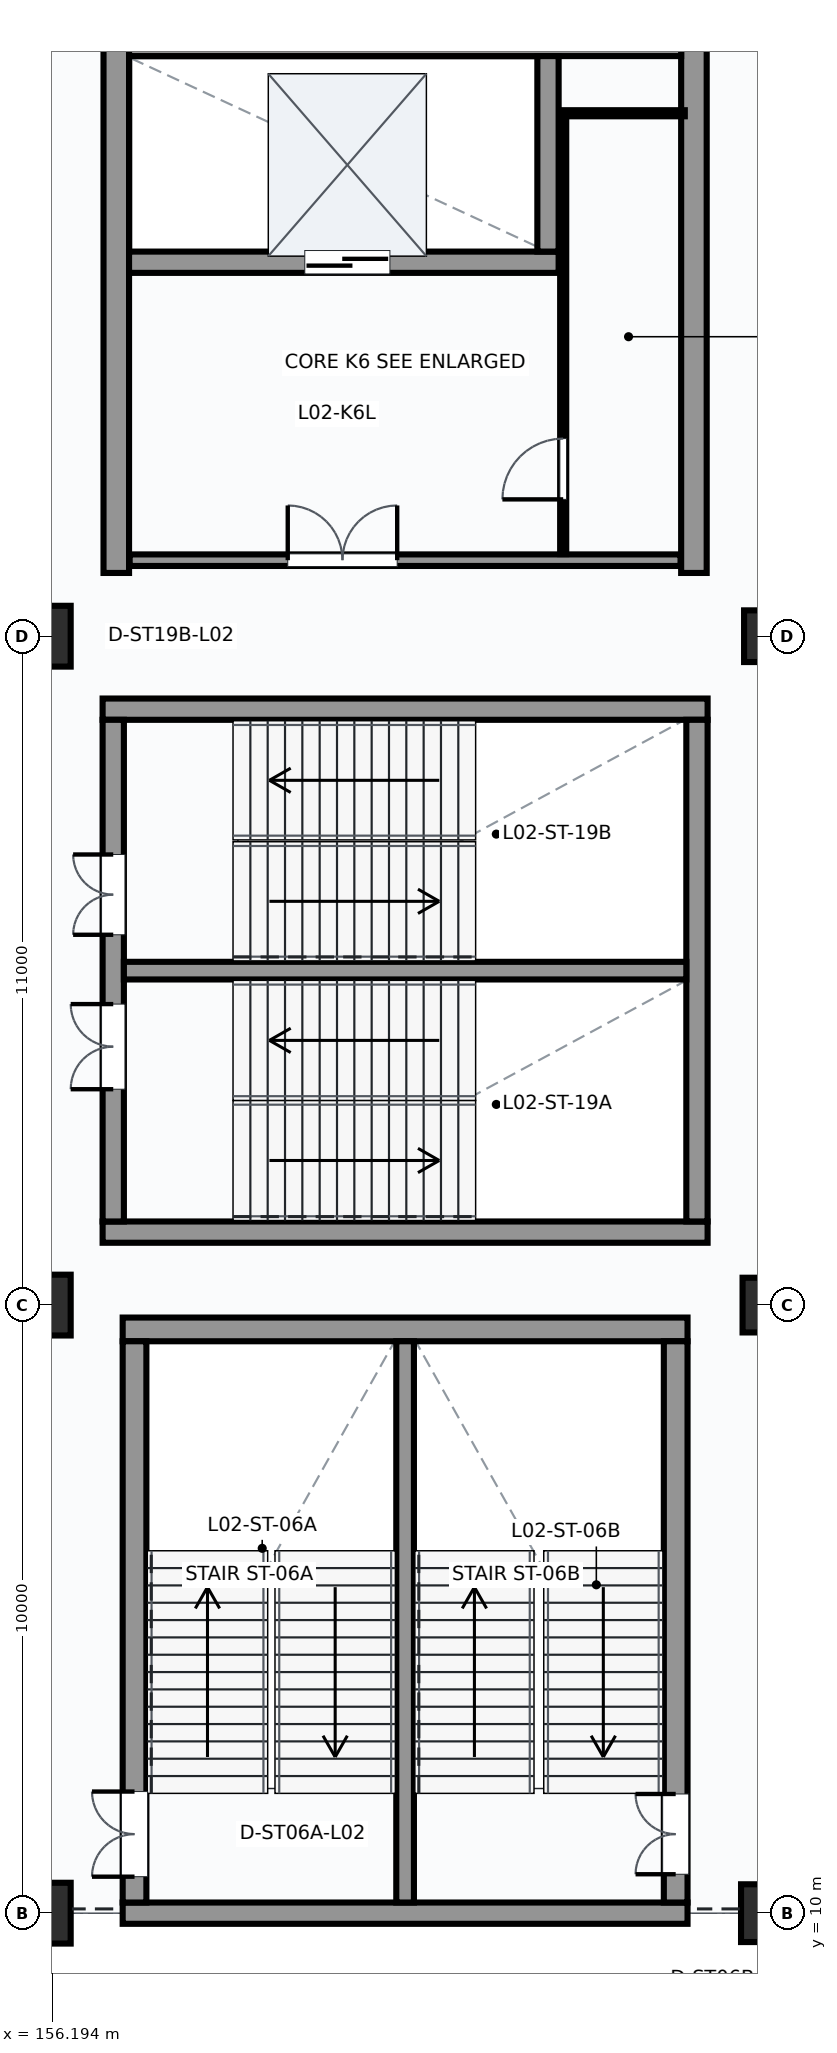
"""IFC4 building model, lengths in metres.
Left out: names, types, materials, properties, quantities, classifications, styles, units other than length and angle.
Written with IfcOpenShell. Run it as: python <this file> out.ifc"""

import sys

from ifc_helpers import new_model, si_unit, direction, frame, frame_2d, origin, origin_2d, place, context, subcontext, project, spatial, rectangle, extrude, element, fill, save


model = new_model("IFC4")
c1 = context("Model", 3, precision=1e-05, world=origin(), true_north=direction((0.0, 1.0)))
c2 = subcontext(c1, "Body", "Model", "MODEL_VIEW")
j1 = project(units=[si_unit("LENGTHUNIT", "METRE"), si_unit("PLANEANGLEUNIT", "RADIAN")], contexts=[c1])
p1 = place(None, origin())
s1 = spatial("IfcSite", under=j1, at=p1, CompositionType="ELEMENT")
p2 = place(p1, origin())
s2 = spatial("IfcBuilding", under=s1, at=p2, CompositionType="ELEMENT")
p3 = place(p2, frame((0.0, 0.0, 10.2)))
s3 = spatial("IfcBuildingStorey", under=s2, at=p3, CompositionType="ELEMENT", Elevation=10.2)
for number, where, z_axis, x_axis in (
    (1, (156.0, 10.0, 0.0), (0.0, 0.0, 1.0), (1.0, 0.0, 0.0)),
    (2, (156.0, 20.0, 0.0), (0.0, 0.0, 1.0), (1.0, 0.0, 0.0)),
    (3, (156.0, 31.0, 0.0), (0.0, 0.0, 1.0), (1.0, 0.0, 0.0)),
):
    element("IfcColumn", number, at=place(p3, frame(where, z_axis=z_axis, x_axis=x_axis)), inside=s3, PredefinedType="COLUMN", context=c2, shape_type="SweptSolid", body=[
        extrude(rectangle(XDim=1.0, YDim=1.0, at=origin_2d()), origin(), (0.0, 0.0, 1.0), 4.5),
    ])
p4 = place(p3, frame((168.0, 10.0, 0.0), z_axis=(0.0, 0.0, 1.0), x_axis=(1.0, 0.0, 0.0)))
e4 = element("IfcColumn", 4, at=p4, inside=s3, PredefinedType="COLUMN", context=c2, shape_type="SweptSolid", body=[
    extrude(rectangle(XDim=0.95, YDim=0.95, at=origin_2d()), origin(), (0.0, 0.0, 1.0), 4.5),
])
p5 = place(p3, frame((168.0, 20.0, 0.0), z_axis=(0.0, 0.0, 1.0), x_axis=(1.0, 0.0, 0.0)))
e5 = element("IfcColumn", 5, at=p5, inside=s3, PredefinedType="COLUMN", context=c2, shape_type="SweptSolid", body=[
    extrude(rectangle(XDim=0.9, YDim=0.9, at=origin_2d()), origin(), (0.0, 0.0, 1.0), 4.5),
])
p6 = place(p3, frame((168.0, 31.0, 0.0), z_axis=(0.0, 0.0, 1.0), x_axis=(1.0, 0.0, 0.0)))
e6 = element("IfcColumn", 6, at=p6, inside=s3, PredefinedType="COLUMN", context=c2, shape_type="SweptSolid", body=[
    extrude(rectangle(XDim=0.85, YDim=0.85, at=origin_2d()), origin(), (0.0, 0.0, 1.0), 4.5),
])
p7 = place(p3, frame((157.355, 10.0, 0.0), z_axis=(0.0, 0.0, 1.0), x_axis=(1.0, 0.0, 0.0)))
e7 = element("IfcWall", 7, at=p7, inside=s3, PredefinedType="SHEAR", context=c2, shape_type="SweptSolid", body=[
    extrude(rectangle(XDim=9.29, YDim=0.35, at=frame_2d((4.645, 0.0))), origin(), (0.0, 0.0, 1.0), 3.664),
])
p8 = place(p3, frame((157.355, 19.6, 0.0), z_axis=(0.0, 0.0, 1.0), x_axis=(1.0, 0.0, 0.0)))
e8 = element("IfcWall", 8, at=p8, inside=s3, PredefinedType="SHEAR", context=c2, shape_type="SweptSolid", body=[
    extrude(rectangle(XDim=9.29, YDim=0.39, at=frame_2d((4.645, 0.0))), origin(), (0.0, 0.0, 1.0), 4.5),
])
p9 = place(p3, frame((157.55, 10.175, 0.0), z_axis=(0.0, 0.0, 1.0), x_axis=(0.0, 1.0, 0.0)))
e9 = element("IfcWall", 9, at=p9, inside=s3, PredefinedType="SHEAR", context=c2, shape_type="SweptSolid", body=[
    extrude(rectangle(XDim=9.23, YDim=0.39, at=frame_2d((4.615, 0.0))), origin(), (0.0, 0.0, 1.0), 4.5),
])
p10 = place(p9, frame((0.425, 0.0, 0.0)))
e10 = element("IfcOpeningElement", 10, at=p10, cuts=e9, PredefinedType="OPENING", context=c2, shape_type="SweptSolid", body=[
    extrude(rectangle(XDim=1.4, YDim=2.2, at=frame_2d((0.7, 1.1))), frame((0.0, 0.205, 0.0), z_axis=(0.0, -1.0, 0.0), x_axis=(1.0, 0.0, 0.0)), (0.0, 0.0, 1.0), 0.41),
])
p11 = place(p3, frame((166.45, 10.175, 0.0), z_axis=(0.0, 0.0, 1.0), x_axis=(0.0, 1.0, 0.0)))
e11 = element("IfcWall", 11, at=p11, inside=s3, PredefinedType="SHEAR", context=c2, shape_type="SweptSolid", body=[
    extrude(rectangle(XDim=9.23, YDim=0.39, at=frame_2d((4.615, 0.0))), origin(), (0.0, 0.0, 1.0), 4.5),
])
p12 = place(p11, frame((0.465, 0.0, 0.0)))
e12 = element("IfcOpeningElement", 12, at=p12, cuts=e11, PredefinedType="OPENING", context=c2, shape_type="SweptSolid", body=[
    extrude(rectangle(XDim=1.32, YDim=2.2, at=frame_2d((0.66, 1.1))), frame((0.0, 0.205, 0.0), z_axis=(0.0, -1.0, 0.0), x_axis=(1.0, 0.0, 0.0)), (0.0, 0.0, 1.0), 0.41),
])
p13 = place(p3, frame((162.0, 10.175, 0.0), z_axis=(0.0, 0.0, 1.0), x_axis=(0.0, 1.0, 0.0)))
e13 = element("IfcWall", 13, at=p13, inside=s3, PredefinedType="SHEAR", context=c2, shape_type="SweptSolid", body=[
    extrude(rectangle(XDim=9.23, YDim=0.29, at=frame_2d((4.615, 0.0))), origin(), (0.0, 0.0, 1.0), 4.5),
])
for number, where, z_axis, x_axis in (
    (14, (157.025, 21.2, 0.0), (0.0, 0.0, 1.0), (1.0, 0.0, 0.0)),
    (15, (157.025, 29.8, 0.0), (0.0, 0.0, 1.0), (1.0, 0.0, 0.0)),
):
    element("IfcWall", number, at=place(p3, frame(where, z_axis=z_axis, x_axis=x_axis)), inside=s3, PredefinedType="SHEAR", context=c2, shape_type="SweptSolid", body=[
        extrude(rectangle(XDim=9.95, YDim=0.35, at=frame_2d((4.975, 0.0))), origin(), (0.0, 0.0, 1.0), 4.5),
    ])
p14 = place(p3, frame((157.2, 21.375, 0.0), z_axis=(0.0, 0.0, 1.0), x_axis=(0.0, 1.0, 0.0)))
e16 = element("IfcWall", 16, at=p14, inside=s3, PredefinedType="SHEAR", context=c2, shape_type="SweptSolid", body=[
    extrude(rectangle(XDim=8.25, YDim=0.35, at=frame_2d((4.125, 0.0))), origin(), (0.0, 0.0, 1.0), 4.5),
])
p15 = place(p14, frame((2.175, 0.0, 0.0)))
e17 = element("IfcOpeningElement", 17, at=p15, cuts=e16, PredefinedType="OPENING", context=c2, shape_type="SweptSolid", body=[
    extrude(rectangle(XDim=1.4, YDim=2.2, at=frame_2d((0.7, 1.1))), frame((0.0, 0.185, 0.0), z_axis=(0.0, -1.0, 0.0), x_axis=(1.0, 0.0, 0.0)), (0.0, 0.0, 1.0), 0.37),
])
p16 = place(p14, frame((4.715, 0.0, 0.0)))
e18 = element("IfcOpeningElement", 18, at=p16, cuts=e16, PredefinedType="OPENING", context=c2, shape_type="SweptSolid", body=[
    extrude(rectangle(XDim=1.32, YDim=2.2, at=frame_2d((0.66, 1.1))), frame((0.0, 0.185, 0.0), z_axis=(0.0, -1.0, 0.0), x_axis=(1.0, 0.0, 0.0)), (0.0, 0.0, 1.0), 0.37),
])
p17 = place(p3, frame((166.8, 21.375, 0.0), z_axis=(0.0, 0.0, 1.0), x_axis=(0.0, 1.0, 0.0)))
e19 = element("IfcWall", 19, at=p17, inside=s3, PredefinedType="SHEAR", context=c2, shape_type="SweptSolid", body=[
    extrude(rectangle(XDim=8.25, YDim=0.35, at=frame_2d((4.125, 0.0))), origin(), (0.0, 0.0, 1.0), 4.5),
])
p18 = place(p3, frame((157.375, 25.5, 0.0), z_axis=(0.0, 0.0, 1.0), x_axis=(1.0, 0.0, 0.0)))
e20 = element("IfcWall", 20, at=p18, inside=s3, PredefinedType="SHEAR", context=c2, shape_type="SweptSolid", body=[
    extrude(rectangle(XDim=9.25, YDim=0.29, at=frame_2d((4.625, 0.0))), origin(), (0.0, 0.0, 1.0), 4.5),
])
for number, where, z_axis, x_axis in (
    (21, (157.25, 32.04, 0.0), (0.0, 0.0, 1.0), (0.0, 1.0, 0.0)),
    (22, (166.75, 32.04, 0.0), (0.0, 0.0, 1.0), (0.0, 1.0, 0.0)),
):
    element("IfcWall", number, at=place(p3, frame(where, z_axis=z_axis, x_axis=x_axis)), inside=s3, PredefinedType="SHEAR", context=c2, shape_type="SweptSolid", body=[
        extrude(rectangle(XDim=8.92, YDim=0.42, at=frame_2d((4.46, 0.0))), origin(), (0.0, 0.0, 1.0), 4.5),
    ])
p19 = place(p3, frame((157.46, 40.75, 0.0), z_axis=(0.0, 0.0, 1.0), x_axis=(1.0, 0.0, 0.0)))
e23 = element("IfcWall", 23, at=p19, inside=s3, PredefinedType="SHEAR", context=c2, shape_type="SweptSolid", body=[
    extrude(rectangle(XDim=9.08, YDim=0.42, at=frame_2d((4.54, 0.0))), origin(), (0.0, 0.0, 1.0), 4.5),
])
p20 = place(p3, frame((157.46, 37.15, 0.0), z_axis=(0.0, 0.0, 1.0), x_axis=(1.0, 0.0, 0.0)))
e24 = element("IfcWall", 24, at=p20, inside=s3, PredefinedType="SHEAR", context=c2, shape_type="SweptSolid", body=[
    extrude(rectangle(XDim=7.065, YDim=0.35, at=frame_2d((3.532, 0.0))), origin(), (0.0, 0.0, 1.0), 4.5),
])
p21 = place(p20, frame((2.89, 0.0, 0.0)))
e25 = element("IfcOpeningElement", 25, at=p21, cuts=e24, PredefinedType="OPENING", context=c2, shape_type="SweptSolid", body=[
    extrude(rectangle(XDim=1.4, YDim=2.3, at=frame_2d((0.7, 1.15))), frame((0.0, 0.185, 0.0), z_axis=(0.0, -1.0, 0.0), x_axis=(1.0, 0.0, 0.0)), (0.0, 0.0, 1.0), 0.37),
])
p22 = place(p3, frame((164.35, 37.325, 0.0), z_axis=(0.0, 0.0, 1.0), x_axis=(0.0, 1.0, 0.0)))
e26 = element("IfcWall", 26, at=p22, inside=s3, PredefinedType="SHEAR", context=c2, shape_type="SweptSolid", body=[
    extrude(rectangle(XDim=3.215, YDim=0.35, at=frame_2d((1.607, 0.0))), origin(), (0.0, 0.0, 1.0), 4.5),
])
p23 = place(p3, frame((157.47, 32.25, 0.0), z_axis=(0.0, 0.0, 1.0), x_axis=(1.0, 0.0, 0.0)))
e27 = element("IfcWall", 27, at=p23, inside=s3, PredefinedType="PARTITIONING", context=c2, shape_type="SweptSolid", body=[
    extrude(rectangle(XDim=9.06, YDim=0.19, at=frame_2d((4.53, 0.0))), origin(), (0.0, 0.0, 1.0), 4.15),
])
p24 = place(p23, frame((2.6, 0.0, 0.0)))
e28 = element("IfcOpeningElement", 28, at=p24, cuts=e27, PredefinedType="OPENING", context=c2, shape_type="SweptSolid", body=[
    extrude(rectangle(XDim=1.8, YDim=2.3, at=frame_2d((0.9, 1.15))), frame((0.0, 0.105, 0.0), z_axis=(0.0, -1.0, 0.0), x_axis=(1.0, 0.0, 0.0)), (0.0, 0.0, 1.0), 0.21),
])
p25 = place(p3, frame((164.6, 32.35, 0.0), z_axis=(0.0, 0.0, 1.0), x_axis=(0.0, 1.0, 0.0)))
e29 = element("IfcWall", 29, at=p25, inside=s3, PredefinedType="PARTITIONING", context=c2, shape_type="SweptSolid", body=[
    extrude(rectangle(XDim=7.25, YDim=0.1, at=frame_2d((3.625, 0.0))), origin(), (0.0, 0.0, 1.0), 4.15),
])
p26 = place(p25, frame((0.9, 0.0, 0.0)))
e30 = element("IfcOpeningElement", 30, at=p26, cuts=e29, PredefinedType="OPENING", context=c2, shape_type="SweptSolid", body=[
    extrude(rectangle(XDim=1.0, YDim=2.1, at=frame_2d((0.5, 1.05))), frame((0.0, 0.06, 0.0), z_axis=(0.0, -1.0, 0.0), x_axis=(1.0, 0.0, 0.0)), (0.0, 0.0, 1.0), 0.12),
])
p27 = place(p3, frame((164.6, 39.6, 0.0), z_axis=(0.0, 0.0, 1.0), x_axis=(1.0, 0.0, 0.0)))
e31 = element("IfcWall", 31, at=p27, inside=s3, PredefinedType="PARTITIONING", context=c2, shape_type="SweptSolid", body=[
    extrude(rectangle(XDim=2.0, YDim=0.1, at=frame_2d((1.0, 0.0))), origin(), (0.0, 0.0, 1.0), 4.15),
])
p28 = place(p10, frame((1.4, 0.0, 0.0), z_axis=(0.0, 0.0, 1.0), x_axis=(-1.0, 0.0, 0.0)))
e32 = element("IfcDoor", 32, at=p28, inside=s3, OperationType="DOUBLE_DOOR_SINGLE_SWING", PredefinedType="DOOR", context=c2, shape_type="SweptSolid", body=[
    extrude(rectangle(XDim=1.4, YDim=2.2, at=frame_2d((0.7, 1.1))), frame((0.0, 0.025, 0.0), z_axis=(0.0, -1.0, 0.0), x_axis=(1.0, 0.0, 0.0)), (0.0, 0.0, 1.0), 0.05),
])
fill(e10, e32)
p29 = place(p12, origin())
e33 = element("IfcDoor", 33, at=p29, inside=s3, OperationType="DOUBLE_DOOR_SINGLE_SWING", PredefinedType="DOOR", context=c2, shape_type="SweptSolid", body=[
    extrude(rectangle(XDim=1.32, YDim=2.2, at=frame_2d((0.66, 1.1))), frame((0.0, 0.025, 0.0), z_axis=(0.0, -1.0, 0.0), x_axis=(1.0, 0.0, 0.0)), (0.0, 0.0, 1.0), 0.05),
])
fill(e12, e33)
p30 = place(p15, origin())
e34 = element("IfcDoor", 34, at=p30, inside=s3, OperationType="DOUBLE_DOOR_SINGLE_SWING", PredefinedType="DOOR", context=c2, shape_type="SweptSolid", body=[
    extrude(rectangle(XDim=1.4, YDim=2.2, at=frame_2d((0.7, 1.1))), frame((0.0, 0.025, 0.0), z_axis=(0.0, -1.0, 0.0), x_axis=(1.0, 0.0, 0.0)), (0.0, 0.0, 1.0), 0.05),
])
fill(e17, e34)
p31 = place(p16, origin())
e35 = element("IfcDoor", 35, at=p31, inside=s3, OperationType="DOUBLE_DOOR_SINGLE_SWING", PredefinedType="DOOR", context=c2, shape_type="SweptSolid", body=[
    extrude(rectangle(XDim=1.32, YDim=2.2, at=frame_2d((0.66, 1.1))), frame((0.0, 0.025, 0.0), z_axis=(0.0, -1.0, 0.0), x_axis=(1.0, 0.0, 0.0)), (0.0, 0.0, 1.0), 0.05),
])
fill(e18, e35)
p32 = place(p21, origin())
e36 = element("IfcDoor", 36, at=p32, inside=s3, OperationType="SLIDING_TO_LEFT", PredefinedType="DOOR", context=c2, shape_type="SweptSolid", body=[
    extrude(rectangle(XDim=1.4, YDim=2.3, at=frame_2d((0.7, 1.15))), frame((0.0, 0.025, 0.0), z_axis=(0.0, -1.0, 0.0), x_axis=(1.0, 0.0, 0.0)), (0.0, 0.0, 1.0), 0.05),
])
fill(e25, e36)
p33 = place(p24, origin())
e37 = element("IfcDoor", 37, at=p33, inside=s3, OperationType="DOUBLE_DOOR_SINGLE_SWING", PredefinedType="DOOR", context=c2, shape_type="SweptSolid", body=[
    extrude(rectangle(XDim=1.8, YDim=2.3, at=frame_2d((0.9, 1.15))), frame((0.0, 0.025, 0.0), z_axis=(0.0, -1.0, 0.0), x_axis=(1.0, 0.0, 0.0)), (0.0, 0.0, 1.0), 0.05),
])
fill(e28, e37)
p34 = place(p26, origin())
e38 = element("IfcDoor", 38, at=p34, inside=s3, OperationType="SINGLE_SWING_LEFT", PredefinedType="DOOR", context=c2, shape_type="SweptSolid", body=[
    extrude(rectangle(XDim=1.0, YDim=2.1, at=frame_2d((0.5, 1.05))), frame((0.0, 0.025, 0.0), z_axis=(0.0, -1.0, 0.0), x_axis=(1.0, 0.0, 0.0)), (0.0, 0.0, 1.0), 0.05),
])
fill(e30, e38)
save(model, sys.argv[1])
